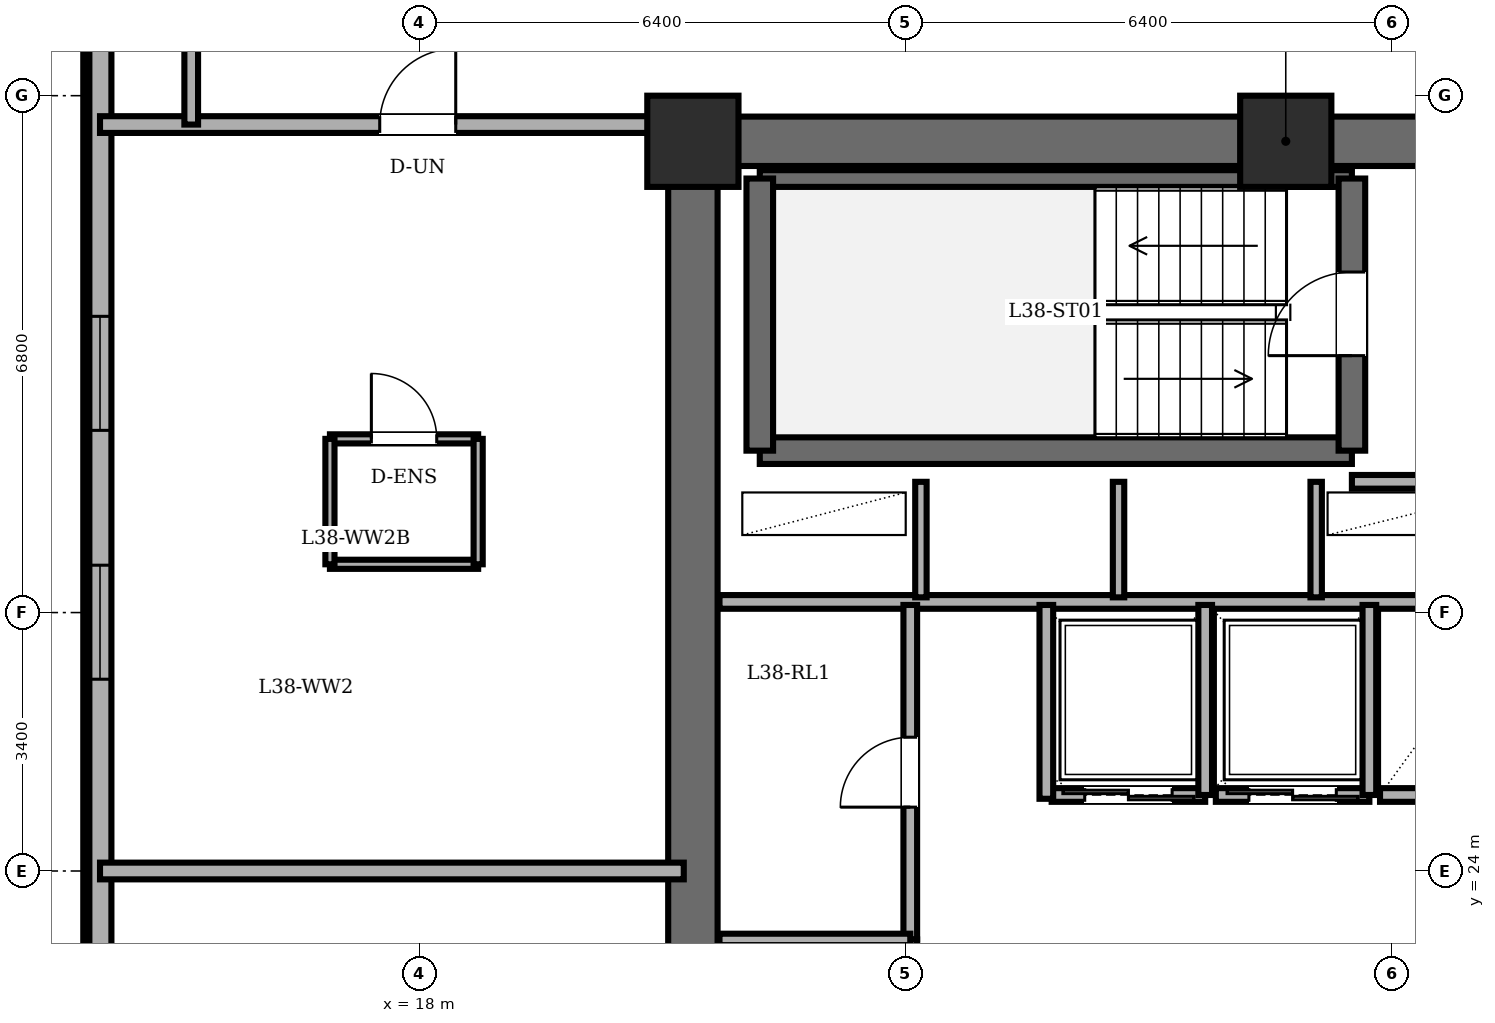
"""IFC4 building model, lengths in metres.
Left out: names, types, materials, properties, quantities, classifications, styles, units other than length and angle.
Written with IfcOpenShell. Run it as: python <this file> out.ifc"""

import sys

from ifc_helpers import new_model, si_unit, direction, frame, frame_2d, origin, origin_2d, place, context, subcontext, project, spatial, rectangle, extrude, element, fill, save


model = new_model("IFC4")
c1 = context("Model", 3, precision=1e-05, world=origin(), true_north=direction((0.0, 1.0)))
c2 = subcontext(c1, "Body", "Model", "MODEL_VIEW")
j1 = project(units=[si_unit("LENGTHUNIT", "METRE"), si_unit("PLANEANGLEUNIT", "RADIAN")], contexts=[c1])
p1 = place(None, origin())
s1 = spatial("IfcSite", under=j1, at=p1, CompositionType="ELEMENT")
p2 = place(p1, origin())
s2 = spatial("IfcBuilding", under=s1, at=p2, CompositionType="ELEMENT")
p3 = place(p2, frame((0.0, 0.0, 147.4)))
s3 = spatial("IfcBuildingStorey", under=s2, at=p3, CompositionType="ELEMENT", Elevation=147.4)
for number, where, z_axis, x_axis in (
    (1, (29.4, 33.6, 0.0), (0.0, 0.0, 1.0), (1.0, 0.0, 0.0)),
    (2, (21.6, 33.6, 0.0), (0.0, 0.0, 1.0), (1.0, 0.0, 0.0)),
):
    element("IfcColumn", number, at=place(p3, frame(where, z_axis=z_axis, x_axis=x_axis)), inside=s3, PredefinedType="COLUMN", context=c2, shape_type="SweptSolid", body=[
        extrude(rectangle(XDim=1.2, YDim=1.2, at=origin_2d()), origin(), (0.0, 0.0, 1.0), 3.6),
    ])
p4 = place(p3, frame((13.8, 36.3, 0.0), z_axis=(0.0, 0.0, 1.0), x_axis=(0.0, -1.0, 0.0)))
e3 = element("IfcWall", 3, at=p4, inside=s3, PredefinedType="SOLIDWALL", context=c2, shape_type="SweptSolid", body=[
    extrude(rectangle(XDim=24.6, YDim=0.3, at=frame_2d((12.3, 0.0))), origin(), (0.0, 0.0, 1.0), 3.4),
])
p5 = place(p4, frame((5.003, 0.0, 0.85)))
e4 = element("IfcOpeningElement", 4, at=p5, cuts=e3, PredefinedType="OPENING", context=c2, shape_type="SweptSolid", body=[
    extrude(rectangle(XDim=1.5, YDim=1.55, at=frame_2d((0.75, 0.775))), frame((0.0, 0.16, 0.0), z_axis=(0.0, -1.0, 0.0), x_axis=(1.0, 0.0, 0.0)), (0.0, 0.0, 1.0), 0.32),
])
p6 = place(p4, frame((8.277, 0.0, 0.85)))
e5 = element("IfcOpeningElement", 5, at=p6, cuts=e3, PredefinedType="OPENING", context=c2, shape_type="SweptSolid", body=[
    extrude(rectangle(XDim=1.5, YDim=1.55, at=frame_2d((0.75, 0.775))), frame((0.0, 0.16, 0.0), z_axis=(0.0, -1.0, 0.0), x_axis=(1.0, 0.0, 0.0)), (0.0, 0.0, 1.0), 0.32),
])
p7 = place(p4, frame((14.823, 0.0, 0.85)))
e6 = element("IfcOpeningElement", 6, at=p7, cuts=e3, PredefinedType="OPENING", context=c2, shape_type="SweptSolid", body=[
    extrude(rectangle(XDim=1.5, YDim=1.55, at=frame_2d((0.75, 0.775))), frame((0.0, 0.16, 0.0), z_axis=(0.0, -1.0, 0.0), x_axis=(1.0, 0.0, 0.0)), (0.0, 0.0, 1.0), 0.32),
])
p8 = place(p4, frame((18.097, 0.0, 0.85)))
e7 = element("IfcOpeningElement", 7, at=p8, cuts=e3, PredefinedType="OPENING", context=c2, shape_type="SweptSolid", body=[
    extrude(rectangle(XDim=1.5, YDim=1.55, at=frame_2d((0.75, 0.775))), frame((0.0, 0.16, 0.0), z_axis=(0.0, -1.0, 0.0), x_axis=(1.0, 0.0, 0.0)), (0.0, 0.0, 1.0), 0.32),
])
p9 = place(p3, frame((21.6, 14.4, 0.0), z_axis=(0.0, 0.0, 1.0), x_axis=(0.0, 1.0, 0.0)))
e8 = element("IfcWall", 8, at=p9, inside=s3, PredefinedType="SHEAR", context=c2, shape_type="SweptSolid", body=[
    extrude(rectangle(XDim=19.2, YDim=0.65, at=frame_2d((9.6, 0.0))), origin(), (0.0, 0.0, 1.0), 3.4),
])
p10 = place(p3, frame((21.6, 33.6, 0.0), z_axis=(0.0, 0.0, 1.0), x_axis=(1.0, 0.0, 0.0)))
e9 = element("IfcWall", 9, at=p10, inside=s3, PredefinedType="SHEAR", context=c2, shape_type="SweptSolid", body=[
    extrude(rectangle(XDim=15.6, YDim=0.65, at=frame_2d((7.8, 0.0))), origin(), (0.0, 0.0, 1.0), 3.4),
])
p11 = place(p3, frame((22.48, 29.53, 0.0), z_axis=(0.0, 0.0, 1.0), x_axis=(1.0, 0.0, 0.0)))
e10 = element("IfcWall", 10, at=p11, inside=s3, PredefinedType="SOLIDWALL", context=c2, shape_type="SweptSolid", body=[
    extrude(rectangle(XDim=7.79, YDim=0.35, at=frame_2d((3.895, 0.0))), origin(), (0.0, 0.0, 1.0), 3.4),
])
p12 = place(p3, frame((22.48, 33.11, 0.0), z_axis=(0.0, 0.0, 1.0), x_axis=(1.0, 0.0, 0.0)))
e11 = element("IfcWall", 11, at=p12, inside=s3, PredefinedType="PARTITIONING", context=c2, shape_type="SweptSolid", body=[
    extrude(rectangle(XDim=7.79, YDim=0.22, at=frame_2d((3.895, 0.0))), origin(), (0.0, 0.0, 1.0), 3.4),
])
p13 = place(p3, frame((22.48, 29.53, 0.0), z_axis=(0.0, 0.0, 1.0), x_axis=(0.0, 1.0, 0.0)))
e12 = element("IfcWall", 12, at=p13, inside=s3, PredefinedType="SOLIDWALL", context=c2, shape_type="SweptSolid", body=[
    extrude(rectangle(XDim=3.58, YDim=0.35, at=frame_2d((1.79, 0.0))), origin(), (0.0, 0.0, 1.0), 3.4),
])
p14 = place(p3, frame((30.27, 29.53, 0.0), z_axis=(0.0, 0.0, 1.0), x_axis=(0.0, 1.0, 0.0)))
e13 = element("IfcWall", 13, at=p14, inside=s3, PredefinedType="SOLIDWALL", context=c2, shape_type="SweptSolid", body=[
    extrude(rectangle(XDim=3.58, YDim=0.35, at=frame_2d((1.79, 0.0))), origin(), (0.0, 0.0, 1.0), 3.4),
])
p15 = place(p14, frame((1.25, 0.0, 0.0)))
e14 = element("IfcOpeningElement", 14, at=p15, cuts=e13, PredefinedType="OPENING", context=c2, shape_type="SweptSolid", body=[
    extrude(rectangle(XDim=1.1, YDim=2.15, at=frame_2d((0.55, 1.075))), frame((0.0, 0.185, 0.0), z_axis=(0.0, -1.0, 0.0), x_axis=(1.0, 0.0, 0.0)), (0.0, 0.0, 1.0), 0.37),
])
p16 = place(p3, frame((30.27, 29.12, 0.0), z_axis=(0.0, 0.0, 1.0), x_axis=(1.0, 0.0, 0.0)))
e15 = element("IfcWall", 15, at=p16, inside=s3, PredefinedType="PARTITIONING", context=c2, shape_type="SweptSolid", body=[
    extrude(rectangle(XDim=2.24, YDim=0.18, at=frame_2d((1.12, 0.0))), origin(), (0.0, 0.0, 1.0), 3.4),
])
p17 = place(p3, frame((21.95, 27.54, 0.0), z_axis=(0.0, 0.0, 1.0), x_axis=(1.0, 0.0, 0.0)))
e16 = element("IfcWall", 16, at=p17, inside=s3, PredefinedType="PARTITIONING", context=c2, shape_type="SweptSolid", body=[
    extrude(rectangle(XDim=10.56, YDim=0.18, at=frame_2d((5.28, 0.0))), origin(), (0.0, 0.0, 1.0), 3.4),
])
for number, where, z_axis, x_axis in (
    (17, (24.6, 27.6, 0.0), (0.0, 0.0, 1.0), (0.0, 1.0, 0.0)),
    (18, (27.2, 27.6, 0.0), (0.0, 0.0, 1.0), (0.0, 1.0, 0.0)),
    (19, (29.8, 27.6, 0.0), (0.0, 0.0, 1.0), (0.0, 1.0, 0.0)),
):
    element("IfcWall", number, at=place(p3, frame(where, z_axis=z_axis, x_axis=x_axis)), inside=s3, PredefinedType="PARTITIONING", context=c2, shape_type="SweptSolid", body=[
        extrude(rectangle(XDim=1.52, YDim=0.15, at=frame_2d((0.76, 0.0))), origin(), (0.0, 0.0, 1.0), 3.4),
    ])
p18 = place(p3, frame((28.34, 25.0, 0.0), z_axis=(0.0, 0.0, 1.0), x_axis=(-1.0, 0.0, 0.0)))
e20 = element("IfcWall", 20, at=p18, inside=s3, PredefinedType="PARTITIONING", context=c2, shape_type="SweptSolid", body=[
    extrude(rectangle(XDim=2.02, YDim=0.18, at=frame_2d((1.01, 0.0))), origin(), (0.0, 0.0, 1.0), 3.4),
])
p19 = place(p18, frame((0.435, 0.0, 0.0)))
e21 = element("IfcOpeningElement", 21, at=p19, cuts=e20, PredefinedType="OPENING", context=c2, shape_type="SweptSolid", body=[
    extrude(rectangle(XDim=1.15, YDim=2.2, at=frame_2d((0.575, 1.1))), frame((0.0, 0.1, 0.0), z_axis=(0.0, -1.0, 0.0), x_axis=(1.0, 0.0, 0.0)), (0.0, 0.0, 1.0), 0.2),
])
p20 = place(p3, frame((28.34, 25.0, 0.0), z_axis=(0.0, 0.0, 1.0), x_axis=(0.0, 1.0, 0.0)))
e22 = element("IfcWall", 22, at=p20, inside=s3, PredefinedType="PARTITIONING", context=c2, shape_type="SweptSolid", body=[
    extrude(rectangle(XDim=2.5, YDim=0.18, at=frame_2d((1.25, 0.0))), origin(), (0.0, 0.0, 1.0), 3.4),
])
p21 = place(p3, frame((30.5, 25.0, 0.0), z_axis=(0.0, 0.0, 1.0), x_axis=(-1.0, 0.0, 0.0)))
e23 = element("IfcWall", 23, at=p21, inside=s3, PredefinedType="PARTITIONING", context=c2, shape_type="SweptSolid", body=[
    extrude(rectangle(XDim=2.02, YDim=0.18, at=frame_2d((1.01, 0.0))), origin(), (0.0, 0.0, 1.0), 3.4),
])
p22 = place(p21, frame((0.435, 0.0, 0.0)))
e24 = element("IfcOpeningElement", 24, at=p22, cuts=e23, PredefinedType="OPENING", context=c2, shape_type="SweptSolid", body=[
    extrude(rectangle(XDim=1.15, YDim=2.2, at=frame_2d((0.575, 1.1))), frame((0.0, 0.1, 0.0), z_axis=(0.0, -1.0, 0.0), x_axis=(1.0, 0.0, 0.0)), (0.0, 0.0, 1.0), 0.2),
])
p23 = place(p3, frame((30.5, 25.0, 0.0), z_axis=(0.0, 0.0, 1.0), x_axis=(0.0, 1.0, 0.0)))
e25 = element("IfcWall", 25, at=p23, inside=s3, PredefinedType="PARTITIONING", context=c2, shape_type="SweptSolid", body=[
    extrude(rectangle(XDim=2.5, YDim=0.18, at=frame_2d((1.25, 0.0))), origin(), (0.0, 0.0, 1.0), 3.4),
])
p24 = place(p3, frame((32.46, 25.0, 0.0), z_axis=(0.0, 0.0, 1.0), x_axis=(-1.0, 0.0, 0.0)))
e26 = element("IfcWall", 26, at=p24, inside=s3, PredefinedType="PARTITIONING", context=c2, shape_type="SweptSolid", body=[
    extrude(rectangle(XDim=1.82, YDim=0.18, at=frame_2d((0.91, 0.0))), origin(), (0.0, 0.0, 1.0), 3.4),
])
p25 = place(p3, frame((24.46, 23.1, 0.0), z_axis=(0.0, 0.0, 1.0), x_axis=(0.0, 1.0, 0.0)))
e27 = element("IfcWall", 27, at=p25, inside=s3, PredefinedType="PARTITIONING", context=c2, shape_type="SweptSolid", body=[
    extrude(rectangle(XDim=4.4, YDim=0.18, at=frame_2d((2.2, 0.0))), origin(), (0.0, 0.0, 1.0), 3.4),
])
p26 = place(p25, frame((1.74, 0.0, 0.0)))
e28 = element("IfcOpeningElement", 28, at=p26, cuts=e27, PredefinedType="OPENING", context=c2, shape_type="SweptSolid", body=[
    extrude(rectangle(XDim=0.92, YDim=2.1, at=frame_2d((0.46, 1.05))), frame((0.0, 0.1, 0.0), z_axis=(0.0, -1.0, 0.0), x_axis=(1.0, 0.0, 0.0)), (0.0, 0.0, 1.0), 0.2),
])
p27 = place(p3, frame((24.46, 19.8, 0.0), z_axis=(0.0, 0.0, 1.0), x_axis=(0.0, 1.0, 0.0)))
e29 = element("IfcWall", 29, at=p27, inside=s3, PredefinedType="PARTITIONING", context=c2, shape_type="SweptSolid", body=[
    extrude(rectangle(XDim=3.3, YDim=0.18, at=frame_2d((1.65, 0.0))), origin(), (0.0, 0.0, 1.0), 3.4),
])
p28 = place(p27, frame((1.19, 0.0, 0.0)))
e30 = element("IfcOpeningElement", 30, at=p28, cuts=e29, PredefinedType="OPENING", context=c2, shape_type="SweptSolid", body=[
    extrude(rectangle(XDim=0.92, YDim=2.1, at=frame_2d((0.46, 1.05))), frame((0.0, 0.1, 0.0), z_axis=(0.0, -1.0, 0.0), x_axis=(1.0, 0.0, 0.0)), (0.0, 0.0, 1.0), 0.2),
])
p29 = place(p3, frame((21.95, 23.1, 0.0), z_axis=(0.0, 0.0, 1.0), x_axis=(1.0, 0.0, 0.0)))
e31 = element("IfcWall", 31, at=p29, inside=s3, PredefinedType="PARTITIONING", context=c2, shape_type="SweptSolid", body=[
    extrude(rectangle(XDim=2.51, YDim=0.15, at=frame_2d((1.255, 0.0))), origin(), (0.0, 0.0, 1.0), 3.4),
])
p30 = place(p3, frame((26.25, 24.95, 0.0), z_axis=(0.0, 0.0, 1.0), x_axis=(0.0, 1.0, 0.0)))
e32 = element("IfcWall", 32, at=p30, inside=s3, PredefinedType="PARTITIONING", context=c2, shape_type="SweptSolid", body=[
    extrude(rectangle(XDim=2.55, YDim=0.18, at=frame_2d((1.275, 0.0))), origin(), (0.0, 0.0, 1.0), 3.4),
])
p31 = place(p3, frame((16.825, 29.685, 0.0), z_axis=(0.0, 0.0, 1.0), x_axis=(1.0, 0.0, 0.0)))
e33 = element("IfcWall", 33, at=p31, inside=s3, PredefinedType="PARTITIONING", context=c2, shape_type="SweptSolid", body=[
    extrude(rectangle(XDim=1.95, YDim=0.12, at=frame_2d((0.975, 0.0))), origin(), (0.0, 0.0, 1.0), 3.4),
])
p32 = place(p31, frame((0.545, 0.0, 0.0)))
e34 = element("IfcOpeningElement", 34, at=p32, cuts=e33, PredefinedType="OPENING", context=c2, shape_type="SweptSolid", body=[
    extrude(rectangle(XDim=0.86, YDim=2.1, at=frame_2d((0.43, 1.05))), frame((0.0, 0.07, 0.0), z_axis=(0.0, -1.0, 0.0), x_axis=(1.0, 0.0, 0.0)), (0.0, 0.0, 1.0), 0.14),
])
p33 = place(p3, frame((18.775, 28.035, 0.0), z_axis=(0.0, 0.0, 1.0), x_axis=(-1.0, 0.0, 0.0)))
e35 = element("IfcWall", 35, at=p33, inside=s3, PredefinedType="PARTITIONING", context=c2, shape_type="SweptSolid", body=[
    extrude(rectangle(XDim=1.95, YDim=0.12, at=frame_2d((0.975, 0.0))), origin(), (0.0, 0.0, 1.0), 3.4),
])
for number, where, z_axis, x_axis in (
    (36, (16.825, 29.685, 0.0), (0.0, 0.0, 1.0), (0.0, -1.0, 0.0)),
    (37, (18.775, 28.035, 0.0), (0.0, 0.0, 1.0), (0.0, 1.0, 0.0)),
):
    element("IfcWall", number, at=place(p3, frame(where, z_axis=z_axis, x_axis=x_axis)), inside=s3, PredefinedType="PARTITIONING", context=c2, shape_type="SweptSolid", body=[
        extrude(rectangle(XDim=1.65, YDim=0.12, at=frame_2d((0.825, 0.0))), origin(), (0.0, 0.0, 1.0), 3.4),
    ])
p34 = place(p3, frame((13.8, 24.0, 0.0), z_axis=(0.0, 0.0, 1.0), x_axis=(1.0, 0.0, 0.0)))
e38 = element("IfcWall", 38, at=p34, inside=s3, PredefinedType="PARTITIONING", context=c2, shape_type="SweptSolid", body=[
    extrude(rectangle(XDim=7.68, YDim=0.22, at=frame_2d((3.84, 0.0))), origin(), (0.0, 0.0, 1.0), 3.4),
])
p35 = place(p3, frame((13.8, 33.82, 0.0), z_axis=(0.0, 0.0, 1.0), x_axis=(1.0, 0.0, 0.0)))
e39 = element("IfcWall", 39, at=p35, inside=s3, PredefinedType="PARTITIONING", context=c2, shape_type="SweptSolid", body=[
    extrude(rectangle(XDim=7.68, YDim=0.22, at=frame_2d((3.84, 0.0))), origin(), (0.0, 0.0, 1.0), 3.4),
])
p36 = place(p35, frame((3.68, 0.0, 0.0)))
e40 = element("IfcOpeningElement", 40, at=p36, cuts=e39, PredefinedType="OPENING", context=c2, shape_type="SweptSolid", body=[
    extrude(rectangle(XDim=1.0, YDim=2.15, at=frame_2d((0.5, 1.075))), frame((0.0, 0.12, 0.0), z_axis=(0.0, -1.0, 0.0), x_axis=(1.0, 0.0, 0.0)), (0.0, 0.0, 1.0), 0.24),
])
p37 = place(p3, frame((15.0, 33.82, 0.0), z_axis=(0.0, 0.0, 1.0), x_axis=(0.0, 1.0, 0.0)))
e41 = element("IfcWall", 41, at=p37, inside=s3, PredefinedType="PARTITIONING", context=c2, shape_type="SweptSolid", body=[
    extrude(rectangle(XDim=5.693, YDim=0.18, at=frame_2d((2.846, 0.0))), origin(), (0.0, 0.0, 1.0), 3.4),
])
p38 = place(p5, origin())
e42 = element("IfcWindow", 42, at=p38, inside=s3, PartitioningType="DOUBLE_PANEL_VERTICAL", PredefinedType="WINDOW", context=c2, shape_type="SweptSolid", body=[
    extrude(rectangle(XDim=1.5, YDim=1.55, at=frame_2d((0.75, 0.775))), frame((0.0, 0.03, 0.0), z_axis=(0.0, -1.0, 0.0), x_axis=(1.0, 0.0, 0.0)), (0.0, 0.0, 1.0), 0.06),
])
fill(e4, e42)
p39 = place(p6, origin())
e43 = element("IfcWindow", 43, at=p39, inside=s3, PartitioningType="DOUBLE_PANEL_VERTICAL", PredefinedType="WINDOW", context=c2, shape_type="SweptSolid", body=[
    extrude(rectangle(XDim=1.5, YDim=1.55, at=frame_2d((0.75, 0.775))), frame((0.0, 0.03, 0.0), z_axis=(0.0, -1.0, 0.0), x_axis=(1.0, 0.0, 0.0)), (0.0, 0.0, 1.0), 0.06),
])
fill(e5, e43)
p40 = place(p15, origin())
e44 = element("IfcDoor", 44, at=p40, inside=s3, OperationType="SINGLE_SWING_LEFT", PredefinedType="DOOR", context=c2, shape_type="SweptSolid", body=[
    extrude(rectangle(XDim=1.1, YDim=2.15, at=frame_2d((0.55, 1.075))), frame((0.0, 0.025, 0.0), z_axis=(0.0, -1.0, 0.0), x_axis=(1.0, 0.0, 0.0)), (0.0, 0.0, 1.0), 0.05),
])
fill(e14, e44)
p41 = place(p19, origin())
e45 = element("IfcDoor", 45, at=p41, inside=s3, OperationType="DOUBLE_DOOR_SLIDING", PredefinedType="DOOR", context=c2, shape_type="SweptSolid", body=[
    extrude(rectangle(XDim=1.15, YDim=2.2, at=frame_2d((0.575, 1.1))), frame((0.0, 0.025, 0.0), z_axis=(0.0, -1.0, 0.0), x_axis=(1.0, 0.0, 0.0)), (0.0, 0.0, 1.0), 0.05),
])
fill(e21, e45)
p42 = place(p22, origin())
e46 = element("IfcDoor", 46, at=p42, inside=s3, OperationType="DOUBLE_DOOR_SLIDING", PredefinedType="DOOR", context=c2, shape_type="SweptSolid", body=[
    extrude(rectangle(XDim=1.15, YDim=2.2, at=frame_2d((0.575, 1.1))), frame((0.0, 0.025, 0.0), z_axis=(0.0, -1.0, 0.0), x_axis=(1.0, 0.0, 0.0)), (0.0, 0.0, 1.0), 0.05),
])
fill(e24, e46)
p43 = place(p26, origin())
e47 = element("IfcDoor", 47, at=p43, inside=s3, OperationType="SINGLE_SWING_LEFT", PredefinedType="DOOR", context=c2, shape_type="SweptSolid", body=[
    extrude(rectangle(XDim=0.92, YDim=2.1, at=frame_2d((0.46, 1.05))), frame((0.0, 0.025, 0.0), z_axis=(0.0, -1.0, 0.0), x_axis=(1.0, 0.0, 0.0)), (0.0, 0.0, 1.0), 0.05),
])
fill(e28, e47)
p44 = place(p32, origin())
e48 = element("IfcDoor", 48, at=p44, inside=s3, OperationType="SINGLE_SWING_LEFT", PredefinedType="DOOR", context=c2, shape_type="SweptSolid", body=[
    extrude(rectangle(XDim=0.86, YDim=2.1, at=frame_2d((0.43, 1.05))), frame((0.0, 0.025, 0.0), z_axis=(0.0, -1.0, 0.0), x_axis=(1.0, 0.0, 0.0)), (0.0, 0.0, 1.0), 0.05),
])
fill(e34, e48)
p45 = place(p36, origin())
e49 = element("IfcDoor", 49, at=p45, inside=s3, OperationType="SINGLE_SWING_RIGHT", PredefinedType="DOOR", context=c2, shape_type="SweptSolid", body=[
    extrude(rectangle(XDim=1.0, YDim=2.15, at=frame_2d((0.5, 1.075))), frame((0.0, 0.025, 0.0), z_axis=(0.0, -1.0, 0.0), x_axis=(1.0, 0.0, 0.0)), (0.0, 0.0, 1.0), 0.05),
])
fill(e40, e49)
save(model, sys.argv[1])
